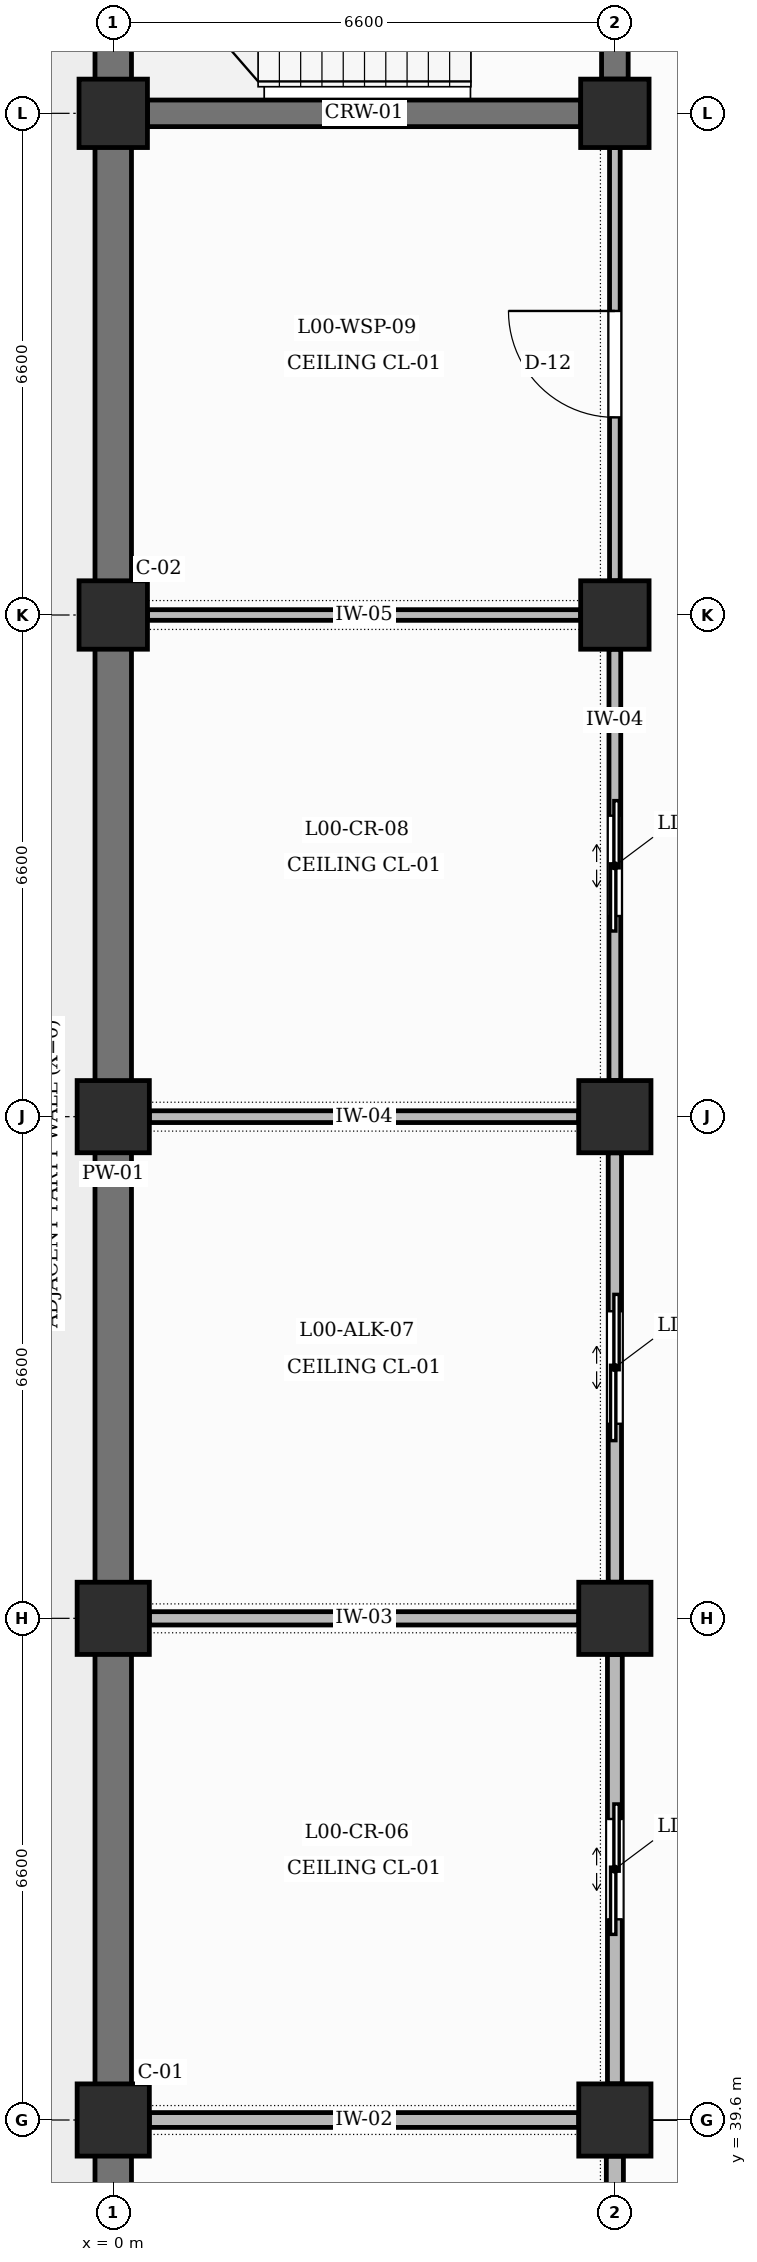
"""IFC4 building model, lengths in metres.
Left out: names, types, materials, properties, quantities, classifications, styles, units other than length and angle.
Written with IfcOpenShell. Run it as: python <this file> out.ifc"""

import sys

from ifc_helpers import new_model, si_unit, direction, frame, frame_2d, origin, origin_2d, place, context, subcontext, project, spatial, rectangle, extrude, element, fill, save


model = new_model("IFC4")
c1 = context("Model", 3, precision=1e-05, world=origin(), true_north=direction((0.0, 1.0)))
c2 = subcontext(c1, "Body", "Model", "MODEL_VIEW")
j1 = project(units=[si_unit("LENGTHUNIT", "METRE"), si_unit("PLANEANGLEUNIT", "RADIAN")], contexts=[c1])
p1 = place(None, origin())
s1 = spatial("IfcSite", under=j1, at=p1, CompositionType="ELEMENT")
p2 = place(p1, origin())
s2 = spatial("IfcBuilding", under=s1, at=p2, CompositionType="ELEMENT")
p3 = place(p2, origin())
s3 = spatial("IfcBuildingStorey", under=s2, at=p3, CompositionType="ELEMENT", Elevation=0.0)
for number, where, z_axis, x_axis in (
    (1, (0.0, 39.6, 0.0), (0.0, 0.0, 1.0), (1.0, 0.0, 0.0)),
    (2, (0.0, 46.2, 0.0), (0.0, 0.0, 1.0), (1.0, 0.0, 0.0)),
    (3, (0.0, 52.8, 0.0), (0.0, 0.0, 1.0), (1.0, 0.0, 0.0)),
):
    element("IfcColumn", number, at=place(p3, frame(where, z_axis=z_axis, x_axis=x_axis)), inside=s3, PredefinedType="COLUMN", context=c2, shape_type="SweptSolid", body=[
        extrude(rectangle(XDim=0.95, YDim=0.95, at=origin_2d()), origin(), (0.0, 0.0, 1.0), 5.4),
    ])
for number, where, z_axis, x_axis in (
    (4, (0.0, 59.4, 0.0), (0.0, 0.0, 1.0), (1.0, 0.0, 0.0)),
    (5, (0.0, 66.0, 0.0), (0.0, 0.0, 1.0), (1.0, 0.0, 0.0)),
):
    element("IfcColumn", number, at=place(p3, frame(where, z_axis=z_axis, x_axis=x_axis)), inside=s3, PredefinedType="COLUMN", context=c2, shape_type="SweptSolid", body=[
        extrude(rectangle(XDim=0.9, YDim=0.9, at=origin_2d()), origin(), (0.0, 0.0, 1.0), 5.4),
    ])
for number, where, z_axis, x_axis in (
    (6, (6.6, 39.6, 0.0), (0.0, 0.0, 1.0), (1.0, 0.0, 0.0)),
    (7, (6.6, 46.2, 0.0), (0.0, 0.0, 1.0), (1.0, 0.0, 0.0)),
    (8, (6.6, 52.8, 0.0), (0.0, 0.0, 1.0), (1.0, 0.0, 0.0)),
):
    element("IfcColumn", number, at=place(p3, frame(where, z_axis=z_axis, x_axis=x_axis)), inside=s3, PredefinedType="COLUMN", context=c2, shape_type="SweptSolid", body=[
        extrude(rectangle(XDim=0.95, YDim=0.95, at=origin_2d()), origin(), (0.0, 0.0, 1.0), 5.4),
    ])
for number, where, z_axis, x_axis in (
    (9, (6.6, 59.4, 0.0), (0.0, 0.0, 1.0), (1.0, 0.0, 0.0)),
    (10, (6.6, 66.0, 0.0), (0.0, 0.0, 1.0), (1.0, 0.0, 0.0)),
):
    element("IfcColumn", number, at=place(p3, frame(where, z_axis=z_axis, x_axis=x_axis)), inside=s3, PredefinedType="COLUMN", context=c2, shape_type="SweptSolid", body=[
        extrude(rectangle(XDim=0.9, YDim=0.9, at=origin_2d()), origin(), (0.0, 0.0, 1.0), 5.4),
    ])
p4 = place(p3, frame((0.0, 33.475, 0.0), z_axis=(0.0, 0.0, 1.0), x_axis=(0.0, 1.0, 0.0)))
e11 = element("IfcWall", 11, at=p4, inside=s3, PredefinedType="SOLIDWALL", context=c2, shape_type="SweptSolid", body=[
    extrude(rectangle(XDim=5.65, YDim=0.48, at=frame_2d((2.825, 0.0))), origin(), (0.0, 0.0, 1.0), 4.45),
])
p5 = place(p3, frame((0.0, 40.075, 0.0), z_axis=(0.0, 0.0, 1.0), x_axis=(0.0, 1.0, 0.0)))
e12 = element("IfcWall", 12, at=p5, inside=s3, PredefinedType="SOLIDWALL", context=c2, shape_type="SweptSolid", body=[
    extrude(rectangle(XDim=5.65, YDim=0.48, at=frame_2d((2.825, 0.0))), origin(), (0.0, 0.0, 1.0), 4.45),
])
p6 = place(p3, frame((0.0, 46.675, 0.0), z_axis=(0.0, 0.0, 1.0), x_axis=(0.0, 1.0, 0.0)))
e13 = element("IfcWall", 13, at=p6, inside=s3, PredefinedType="SOLIDWALL", context=c2, shape_type="SweptSolid", body=[
    extrude(rectangle(XDim=5.65, YDim=0.48, at=frame_2d((2.825, 0.0))), origin(), (0.0, 0.0, 1.0), 4.45),
])
p7 = place(p3, frame((0.0, 53.275, 0.0), z_axis=(0.0, 0.0, 1.0), x_axis=(0.0, 1.0, 0.0)))
e14 = element("IfcWall", 14, at=p7, inside=s3, PredefinedType="SOLIDWALL", context=c2, shape_type="SweptSolid", body=[
    extrude(rectangle(XDim=5.675, YDim=0.48, at=frame_2d((2.837, 0.0))), origin(), (0.0, 0.0, 1.0), 4.45),
])
for number, where, z_axis, x_axis in (
    (15, (0.0, 59.85, 0.0), (0.0, 0.0, 1.0), (0.0, 1.0, 0.0)),
    (16, (0.0, 66.45, 0.0), (0.0, 0.0, 1.0), (0.0, 1.0, 0.0)),
):
    element("IfcWall", number, at=place(p3, frame(where, z_axis=z_axis, x_axis=x_axis)), inside=s3, PredefinedType="SOLIDWALL", context=c2, shape_type="SweptSolid", body=[
        extrude(rectangle(XDim=5.7, YDim=0.48, at=frame_2d((2.85, 0.0))), origin(), (0.0, 0.0, 1.0), 4.45),
    ])
p8 = place(p3, frame((0.45, 66.0, 0.0), z_axis=(0.0, 0.0, 1.0), x_axis=(1.0, 0.0, 0.0)))
e17 = element("IfcWall", 17, at=p8, inside=s3, PredefinedType="SHEAR", context=c2, shape_type="SweptSolid", body=[
    extrude(rectangle(XDim=5.7, YDim=0.35, at=frame_2d((2.85, 0.0))), origin(), (0.0, 0.0, 1.0), 4.2),
])
p9 = place(p3, frame((6.6, 66.45, 0.0), z_axis=(0.0, 0.0, 1.0), x_axis=(0.0, 1.0, 0.0)))
e18 = element("IfcWall", 18, at=p9, inside=s3, PredefinedType="SHEAR", context=c2, shape_type="SweptSolid", body=[
    extrude(rectangle(XDim=5.7, YDim=0.35, at=frame_2d((2.85, 0.0))), origin(), (0.0, 0.0, 1.0), 4.3),
])
p10 = place(p9, frame((2.275, 0.0, 0.0)))
e19 = element("IfcOpeningElement", 19, at=p10, cuts=e18, PredefinedType="OPENING", context=c2, shape_type="SweptSolid", body=[
    extrude(rectangle(XDim=1.15, YDim=2.2, at=frame_2d((0.575, 1.1))), frame((0.0, 0.185, 0.0), z_axis=(0.0, -1.0, 0.0), x_axis=(1.0, 0.0, 0.0)), (0.0, 0.0, 1.0), 0.37),
])
p11 = place(p3, frame((6.6, 33.475, 0.0), z_axis=(0.0, 0.0, 1.0), x_axis=(0.0, 1.0, 0.0)))
e20 = element("IfcWall", 20, at=p11, inside=s3, PredefinedType="PARTITIONING", context=c2, shape_type="SweptSolid", body=[
    extrude(rectangle(XDim=5.65, YDim=0.225, at=frame_2d((2.825, 0.0))), origin(), (0.0, 0.0, 1.0), 4.3),
])
p12 = place(p11, frame((2.085, 0.0, 0.0)))
e21 = element("IfcOpeningElement", 21, at=p12, cuts=e20, PredefinedType="OPENING", context=c2, shape_type="SweptSolid", body=[
    extrude(rectangle(XDim=1.48, YDim=2.25, at=frame_2d((0.74, 1.125))), frame((0.0, 0.123, 0.0), z_axis=(0.0, -1.0, 0.0), x_axis=(1.0, 0.0, 0.0)), (0.0, 0.0, 1.0), 0.245),
])
p13 = place(p3, frame((0.475, 39.6, 0.0), z_axis=(0.0, 0.0, 1.0), x_axis=(1.0, 0.0, 0.0)))
e22 = element("IfcWall", 22, at=p13, inside=s3, PredefinedType="PARTITIONING", context=c2, shape_type="SweptSolid", body=[
    extrude(rectangle(XDim=5.65, YDim=0.195, at=frame_2d((2.825, 0.0))), origin(), (0.0, 0.0, 1.0), 4.2),
])
p14 = place(p3, frame((6.6, 40.075, 0.0), z_axis=(0.0, 0.0, 1.0), x_axis=(0.0, 1.0, 0.0)))
e23 = element("IfcWall", 23, at=p14, inside=s3, PredefinedType="PARTITIONING", context=c2, shape_type="SweptSolid", body=[
    extrude(rectangle(XDim=5.65, YDim=0.195, at=frame_2d((2.825, 0.0))), origin(), (0.0, 0.0, 1.0), 4.3),
])
p15 = place(p14, frame((2.165, 0.0, 0.0)))
e24 = element("IfcOpeningElement", 24, at=p15, cuts=e23, PredefinedType="OPENING", context=c2, shape_type="SweptSolid", body=[
    extrude(rectangle(XDim=1.32, YDim=2.2, at=frame_2d((0.66, 1.1))), frame((0.0, 0.107, 0.0), z_axis=(0.0, -1.0, 0.0), x_axis=(1.0, 0.0, 0.0)), (0.0, 0.0, 1.0), 0.215),
])
p16 = place(p3, frame((0.475, 46.2, 0.0), z_axis=(0.0, 0.0, 1.0), x_axis=(1.0, 0.0, 0.0)))
e25 = element("IfcWall", 25, at=p16, inside=s3, PredefinedType="PARTITIONING", context=c2, shape_type="SweptSolid", body=[
    extrude(rectangle(XDim=5.65, YDim=0.175, at=frame_2d((2.825, 0.0))), origin(), (0.0, 0.0, 1.0), 4.3),
])
p17 = place(p3, frame((6.6, 46.675, 0.0), z_axis=(0.0, 0.0, 1.0), x_axis=(0.0, 1.0, 0.0)))
e26 = element("IfcWall", 26, at=p17, inside=s3, PredefinedType="PARTITIONING", context=c2, shape_type="SweptSolid", body=[
    extrude(rectangle(XDim=5.65, YDim=0.175, at=frame_2d((2.825, 0.0))), origin(), (0.0, 0.0, 1.0), 4.3),
])
p18 = place(p17, frame((2.085, 0.0, 0.0)))
e27 = element("IfcOpeningElement", 27, at=p18, cuts=e26, PredefinedType="OPENING", context=c2, shape_type="SweptSolid", body=[
    extrude(rectangle(XDim=1.48, YDim=2.25, at=frame_2d((0.74, 1.125))), frame((0.0, 0.097, 0.0), z_axis=(0.0, -1.0, 0.0), x_axis=(1.0, 0.0, 0.0)), (0.0, 0.0, 1.0), 0.195),
])
p19 = place(p3, frame((0.475, 52.8, 0.0), z_axis=(0.0, 0.0, 1.0), x_axis=(1.0, 0.0, 0.0)))
e28 = element("IfcWall", 28, at=p19, inside=s3, PredefinedType="PARTITIONING", context=c2, shape_type="SweptSolid", body=[
    extrude(rectangle(XDim=5.65, YDim=0.155, at=frame_2d((2.825, 0.0))), origin(), (0.0, 0.0, 1.0), 4.2),
])
p20 = place(p3, frame((6.6, 53.275, 0.0), z_axis=(0.0, 0.0, 1.0), x_axis=(0.0, 1.0, 0.0)))
e29 = element("IfcWall", 29, at=p20, inside=s3, PredefinedType="PARTITIONING", context=c2, shape_type="SweptSolid", body=[
    extrude(rectangle(XDim=5.675, YDim=0.155, at=frame_2d((2.837, 0.0))), origin(), (0.0, 0.0, 1.0), 4.3),
])
p21 = place(p20, frame((2.165, 0.0, 0.0)))
e30 = element("IfcOpeningElement", 30, at=p21, cuts=e29, PredefinedType="OPENING", context=c2, shape_type="SweptSolid", body=[
    extrude(rectangle(XDim=1.32, YDim=2.2, at=frame_2d((0.66, 1.1))), frame((0.0, 0.087, 0.0), z_axis=(0.0, -1.0, 0.0), x_axis=(1.0, 0.0, 0.0)), (0.0, 0.0, 1.0), 0.175),
])
p22 = place(p3, frame((0.45, 59.4, 0.0), z_axis=(0.0, 0.0, 1.0), x_axis=(1.0, 0.0, 0.0)))
e31 = element("IfcWall", 31, at=p22, inside=s3, PredefinedType="PARTITIONING", context=c2, shape_type="SweptSolid", body=[
    extrude(rectangle(XDim=5.7, YDim=0.14, at=frame_2d((2.85, 0.0))), origin(), (0.0, 0.0, 1.0), 4.3),
])
p23 = place(p3, frame((6.6, 59.85, 0.0), z_axis=(0.0, 0.0, 1.0), x_axis=(0.0, 1.0, 0.0)))
e32 = element("IfcWall", 32, at=p23, inside=s3, PredefinedType="PARTITIONING", context=c2, shape_type="SweptSolid", body=[
    extrude(rectangle(XDim=5.7, YDim=0.14, at=frame_2d((2.85, 0.0))), origin(), (0.0, 0.0, 1.0), 4.3),
])
p24 = place(p23, frame((2.15, 0.0, 0.0)))
e33 = element("IfcOpeningElement", 33, at=p24, cuts=e32, PredefinedType="OPENING", context=c2, shape_type="SweptSolid", body=[
    extrude(rectangle(XDim=1.4, YDim=2.25, at=frame_2d((0.7, 1.125))), frame((0.0, 0.08, 0.0), z_axis=(0.0, -1.0, 0.0), x_axis=(1.0, 0.0, 0.0)), (0.0, 0.0, 1.0), 0.16),
])
p25 = place(p15, origin())
e34 = element("IfcDoor", 34, at=p25, inside=s3, OperationType="DOUBLE_DOOR_SLIDING", PredefinedType="USERDEFINED", context=c2, shape_type="SweptSolid", body=[
    extrude(rectangle(XDim=1.32, YDim=2.2, at=frame_2d((0.66, 1.1))), frame((0.0, 0.025, 0.0), z_axis=(0.0, -1.0, 0.0), x_axis=(1.0, 0.0, 0.0)), (0.0, 0.0, 1.0), 0.05),
])
fill(e24, e34)
p26 = place(p18, origin())
e35 = element("IfcDoor", 35, at=p26, inside=s3, OperationType="DOUBLE_DOOR_SLIDING", PredefinedType="USERDEFINED", context=c2, shape_type="SweptSolid", body=[
    extrude(rectangle(XDim=1.48, YDim=2.25, at=frame_2d((0.74, 1.125))), frame((0.0, 0.025, 0.0), z_axis=(0.0, -1.0, 0.0), x_axis=(1.0, 0.0, 0.0)), (0.0, 0.0, 1.0), 0.05),
])
fill(e27, e35)
p27 = place(p21, origin())
e36 = element("IfcDoor", 36, at=p27, inside=s3, OperationType="DOUBLE_DOOR_SLIDING", PredefinedType="USERDEFINED", context=c2, shape_type="SweptSolid", body=[
    extrude(rectangle(XDim=1.32, YDim=2.2, at=frame_2d((0.66, 1.1))), frame((0.0, 0.025, 0.0), z_axis=(0.0, -1.0, 0.0), x_axis=(1.0, 0.0, 0.0)), (0.0, 0.0, 1.0), 0.05),
])
fill(e30, e36)
p28 = place(p24, origin())
e37 = element("IfcDoor", 37, at=p28, inside=s3, OperationType="SINGLE_SWING_RIGHT", PredefinedType="DOOR", context=c2, shape_type="SweptSolid", body=[
    extrude(rectangle(XDim=1.4, YDim=2.25, at=frame_2d((0.7, 1.125))), frame((0.0, 0.025, 0.0), z_axis=(0.0, -1.0, 0.0), x_axis=(1.0, 0.0, 0.0)), (0.0, 0.0, 1.0), 0.05),
])
fill(e33, e37)
save(model, sys.argv[1])
